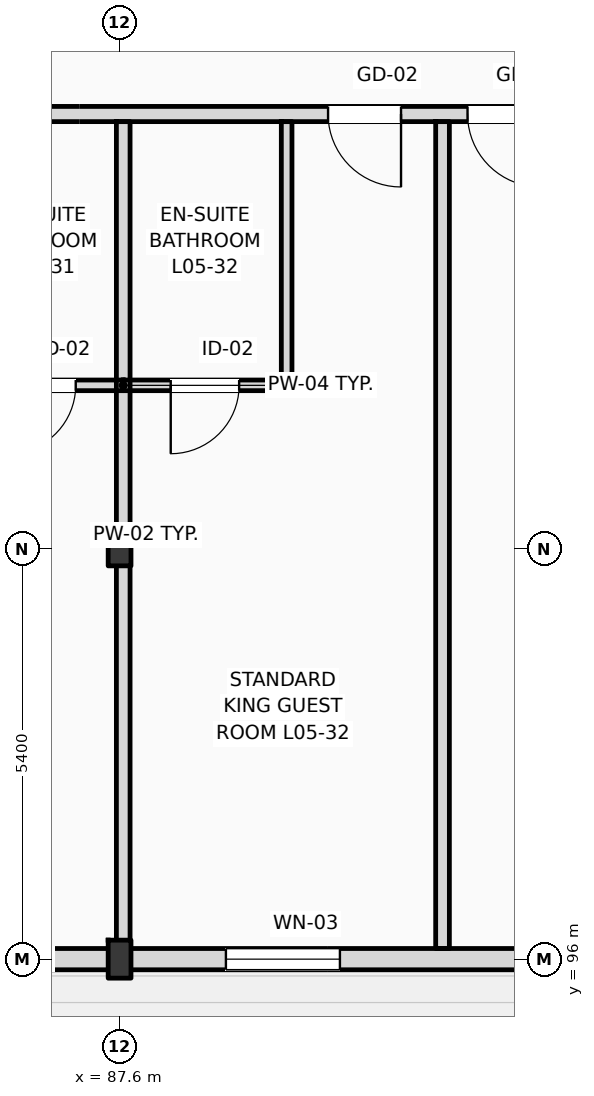
"""IFC4 building model, lengths in metres.
Left out: names, types, materials, properties, quantities, classifications, styles, units other than length and angle.
Written with IfcOpenShell. Run it as: python <this file> out.ifc"""

import sys

from ifc_helpers import new_model, si_unit, direction, frame, frame_2d, origin, origin_2d, place, context, subcontext, project, spatial, rectangle, i_section, extrude, element, fill, save


model = new_model("IFC4")
c1 = context("Model", 3, precision=1e-05, world=origin(), true_north=direction((0.0, 1.0)))
c2 = subcontext(c1, "Body", "Model", "MODEL_VIEW")
j1 = project(units=[si_unit("LENGTHUNIT", "METRE"), si_unit("PLANEANGLEUNIT", "RADIAN")], contexts=[c1])
p1 = place(None, origin())
s1 = spatial("IfcSite", under=j1, at=p1, CompositionType="ELEMENT")
p2 = place(p1, origin())
s2 = spatial("IfcBuilding", under=s1, at=p2, CompositionType="ELEMENT")
p3 = place(p2, frame((0.0, 0.0, 24.6)))
s3 = spatial("IfcBuildingStorey", under=s2, at=p3, CompositionType="ELEMENT", Elevation=24.6)
p4 = place(p3, frame((87.6, 96.0, 0.0), z_axis=(0.0, 0.0, 1.0), x_axis=(1.0, 0.0, 0.0)))
e1 = element("IfcColumn", 1, at=p4, inside=s3, PredefinedType="COLUMN", context=c2, shape_type="SweptSolid", body=[
    extrude(i_section(OverallWidth=0.3, OverallDepth=0.5, WebThickness=0.014, FlangeThickness=0.028, FilletRadius=0.027, at=origin_2d()), origin(), (0.0, 0.0, 1.0), 3.6),
])
p5 = place(p3, frame((87.6, 101.4, 0.0), z_axis=(0.0, 0.0, 1.0), x_axis=(1.0, 0.0, 0.0)))
e2 = element("IfcColumn", 2, at=p5, inside=s3, PredefinedType="COLUMN", context=c2, shape_type="SweptSolid", body=[
    extrude(i_section(OverallWidth=0.3, OverallDepth=0.45, WebThickness=0.014, FlangeThickness=0.026, FilletRadius=0.027, at=origin_2d()), origin(), (0.0, 0.0, 1.0), 3.6),
])
p6 = place(p3, frame((25.2, 96.0, 0.0), z_axis=(0.0, 0.0, 1.0), x_axis=(1.0, 0.0, 0.0)))
e3 = element("IfcWall", 3, at=p6, inside=s3, PredefinedType="STANDARD", context=c2, shape_type="SweptSolid", body=[
    extrude(rectangle(XDim=94.8, YDim=0.28, at=frame_2d((47.4, 0.0))), origin(), (0.0, 0.0, 1.0), 2.78),
])
p7 = place(p6, frame((16.539, 0.0, 0.9)))
e4 = element("IfcOpeningElement", 4, at=p7, cuts=e3, PredefinedType="OPENING", context=c2, shape_type="SweptSolid", body=[
    extrude(rectangle(XDim=1.75, YDim=1.7, at=frame_2d((0.875, 0.85))), frame((0.0, 0.15, 0.0), z_axis=(0.0, -1.0, 0.0), x_axis=(1.0, 0.0, 0.0)), (0.0, 0.0, 1.0), 0.3),
])
p8 = place(p6, frame((20.367, 0.0, 0.9)))
e5 = element("IfcOpeningElement", 5, at=p8, cuts=e3, PredefinedType="OPENING", context=c2, shape_type="SweptSolid", body=[
    extrude(rectangle(XDim=2.0, YDim=1.7, at=frame_2d((1.0, 0.85))), frame((0.0, 0.15, 0.0), z_axis=(0.0, -1.0, 0.0), x_axis=(1.0, 0.0, 0.0)), (0.0, 0.0, 1.0), 0.3),
])
p9 = place(p6, frame((24.326, 0.0, 0.9)))
e6 = element("IfcOpeningElement", 6, at=p9, cuts=e3, PredefinedType="OPENING", context=c2, shape_type="SweptSolid", body=[
    extrude(rectangle(XDim=2.3, YDim=1.7, at=frame_2d((1.15, 0.85))), frame((0.0, 0.15, 0.0), z_axis=(0.0, -1.0, 0.0), x_axis=(1.0, 0.0, 0.0)), (0.0, 0.0, 1.0), 0.3),
])
p10 = place(p6, frame((27.684, 0.0, 0.9)))
e7 = element("IfcOpeningElement", 7, at=p10, cuts=e3, PredefinedType="OPENING", context=c2, shape_type="SweptSolid", body=[
    extrude(rectangle(XDim=2.6, YDim=1.7, at=frame_2d((1.3, 0.85))), frame((0.0, 0.15, 0.0), z_axis=(0.0, -1.0, 0.0), x_axis=(1.0, 0.0, 0.0)), (0.0, 0.0, 1.0), 0.3),
])
p11 = place(p6, frame((32.083, 0.0, 0.9)))
e8 = element("IfcOpeningElement", 8, at=p11, cuts=e3, PredefinedType="OPENING", context=c2, shape_type="SweptSolid", body=[
    extrude(rectangle(XDim=2.419, YDim=1.7, at=frame_2d((1.209, 0.85))), frame((0.0, 0.15, 0.0), z_axis=(0.0, -1.0, 0.0), x_axis=(1.0, 0.0, 0.0)), (0.0, 0.0, 1.0), 0.3),
])
p12 = place(p6, frame((35.322, 0.0, 0.9)))
e9 = element("IfcOpeningElement", 9, at=p12, cuts=e3, PredefinedType="OPENING", context=c2, shape_type="SweptSolid", body=[
    extrude(rectangle(XDim=2.868, YDim=1.7, at=frame_2d((1.434, 0.85))), frame((0.0, 0.15, 0.0), z_axis=(0.0, -1.0, 0.0), x_axis=(1.0, 0.0, 0.0)), (0.0, 0.0, 1.0), 0.3),
])
p13 = place(p6, frame((56.015, 0.0, 0.9)))
e10 = element("IfcOpeningElement", 10, at=p13, cuts=e3, PredefinedType="OPENING", context=c2, shape_type="SweptSolid", body=[
    extrude(rectangle(XDim=1.2, YDim=1.7, at=frame_2d((0.6, 0.85))), frame((0.0, 0.15, 0.0), z_axis=(0.0, -1.0, 0.0), x_axis=(1.0, 0.0, 0.0)), (0.0, 0.0, 1.0), 0.3),
])
p14 = place(p6, frame((59.888, 0.0, 0.9)))
e11 = element("IfcOpeningElement", 11, at=p14, cuts=e3, PredefinedType="OPENING", context=c2, shape_type="SweptSolid", body=[
    extrude(rectangle(XDim=1.35, YDim=1.7, at=frame_2d((0.675, 0.85))), frame((0.0, 0.15, 0.0), z_axis=(0.0, -1.0, 0.0), x_axis=(1.0, 0.0, 0.0)), (0.0, 0.0, 1.0), 0.3),
])
p15 = place(p6, frame((63.799, 0.0, 0.9)))
e12 = element("IfcOpeningElement", 12, at=p15, cuts=e3, PredefinedType="OPENING", context=c2, shape_type="SweptSolid", body=[
    extrude(rectangle(XDim=1.5, YDim=1.7, at=frame_2d((0.75, 0.85))), frame((0.0, 0.15, 0.0), z_axis=(0.0, -1.0, 0.0), x_axis=(1.0, 0.0, 0.0)), (0.0, 0.0, 1.0), 0.3),
])
p16 = place(p6, frame((67.709, 0.0, 0.9)))
e13 = element("IfcOpeningElement", 13, at=p16, cuts=e3, PredefinedType="OPENING", context=c2, shape_type="SweptSolid", body=[
    extrude(rectangle(XDim=1.65, YDim=1.7, at=frame_2d((0.825, 0.85))), frame((0.0, 0.15, 0.0), z_axis=(0.0, -1.0, 0.0), x_axis=(1.0, 0.0, 0.0)), (0.0, 0.0, 1.0), 0.3),
])
p17 = place(p6, frame((71.618, 0.0, 0.9)))
e14 = element("IfcOpeningElement", 14, at=p17, cuts=e3, PredefinedType="OPENING", context=c2, shape_type="SweptSolid", body=[
    extrude(rectangle(XDim=1.8, YDim=1.7, at=frame_2d((0.9, 0.85))), frame((0.0, 0.15, 0.0), z_axis=(0.0, -1.0, 0.0), x_axis=(1.0, 0.0, 0.0)), (0.0, 0.0, 1.0), 0.3),
])
p18 = place(p6, frame((75.129, 0.0, 0.9)))
e15 = element("IfcOpeningElement", 15, at=p18, cuts=e3, PredefinedType="OPENING", context=c2, shape_type="SweptSolid", body=[
    extrude(rectangle(XDim=1.95, YDim=1.7, at=frame_2d((0.975, 0.85))), frame((0.0, 0.15, 0.0), z_axis=(0.0, -1.0, 0.0), x_axis=(1.0, 0.0, 0.0)), (0.0, 0.0, 1.0), 0.3),
])
p19 = place(p6, frame((79.439, 0.0, 0.9)))
e16 = element("IfcOpeningElement", 16, at=p19, cuts=e3, PredefinedType="OPENING", context=c2, shape_type="SweptSolid", body=[
    extrude(rectangle(XDim=2.1, YDim=1.7, at=frame_2d((1.05, 0.85))), frame((0.0, 0.15, 0.0), z_axis=(0.0, -1.0, 0.0), x_axis=(1.0, 0.0, 0.0)), (0.0, 0.0, 1.0), 0.3),
])
p20 = place(p6, frame((83.349, 0.0, 0.9)))
e17 = element("IfcOpeningElement", 17, at=p20, cuts=e3, PredefinedType="OPENING", context=c2, shape_type="SweptSolid", body=[
    extrude(rectangle(XDim=2.25, YDim=1.7, at=frame_2d((1.125, 0.85))), frame((0.0, 0.15, 0.0), z_axis=(0.0, -1.0, 0.0), x_axis=(1.0, 0.0, 0.0)), (0.0, 0.0, 1.0), 0.3),
])
p21 = place(p6, frame((87.258, 0.0, 0.9)))
e18 = element("IfcOpeningElement", 18, at=p21, cuts=e3, PredefinedType="OPENING", context=c2, shape_type="SweptSolid", body=[
    extrude(rectangle(XDim=2.4, YDim=1.7, at=frame_2d((1.2, 0.85))), frame((0.0, 0.15, 0.0), z_axis=(0.0, -1.0, 0.0), x_axis=(1.0, 0.0, 0.0)), (0.0, 0.0, 1.0), 0.3),
])
p22 = place(p6, frame((91.204, 0.0, 0.9)))
e19 = element("IfcOpeningElement", 19, at=p22, cuts=e3, PredefinedType="OPENING", context=c2, shape_type="SweptSolid", body=[
    extrude(rectangle(XDim=2.55, YDim=1.7, at=frame_2d((1.275, 0.85))), frame((0.0, 0.15, 0.0), z_axis=(0.0, -1.0, 0.0), x_axis=(1.0, 0.0, 0.0)), (0.0, 0.0, 1.0), 0.3),
])
p23 = place(p3, frame((79.76, 107.12, 0.0), z_axis=(0.0, 0.0, 1.0), x_axis=(1.0, 0.0, 0.0)))
e20 = element("IfcWall", 20, at=p23, inside=s3, PredefinedType="PARTITIONING", context=c2, shape_type="SweptSolid", body=[
    extrude(rectangle(XDim=40.1, YDim=0.2, at=frame_2d((20.05, 0.0))), origin(), (0.0, 0.0, 1.0), 3.34),
])
p24 = place(p23, frame((2.65, 0.0, 0.0)))
e21 = element("IfcOpeningElement", 21, at=p24, cuts=e20, PredefinedType="OPENING", context=c2, shape_type="SweptSolid", body=[
    extrude(rectangle(XDim=0.96, YDim=2.2, at=frame_2d((0.48, 1.1))), frame((0.0, 0.11, 0.0), z_axis=(0.0, -1.0, 0.0), x_axis=(1.0, 0.0, 0.0)), (0.0, 0.0, 1.0), 0.22),
])
p25 = place(p23, frame((4.448, 0.0, 0.0)))
e22 = element("IfcOpeningElement", 22, at=p25, cuts=e20, PredefinedType="OPENING", context=c2, shape_type="SweptSolid", body=[
    extrude(rectangle(XDim=0.96, YDim=2.2, at=frame_2d((0.48, 1.1))), frame((0.0, 0.11, 0.0), z_axis=(0.0, -1.0, 0.0), x_axis=(1.0, 0.0, 0.0)), (0.0, 0.0, 1.0), 0.22),
])
p26 = place(p23, frame((10.583, 0.0, 0.0)))
e23 = element("IfcOpeningElement", 23, at=p26, cuts=e20, PredefinedType="OPENING", context=c2, shape_type="SweptSolid", body=[
    extrude(rectangle(XDim=0.96, YDim=2.2, at=frame_2d((0.48, 1.1))), frame((0.0, 0.11, 0.0), z_axis=(0.0, -1.0, 0.0), x_axis=(1.0, 0.0, 0.0)), (0.0, 0.0, 1.0), 0.22),
])
p27 = place(p23, frame((12.418, 0.0, 0.0)))
e24 = element("IfcOpeningElement", 24, at=p27, cuts=e20, PredefinedType="OPENING", context=c2, shape_type="SweptSolid", body=[
    extrude(rectangle(XDim=0.96, YDim=2.2, at=frame_2d((0.48, 1.1))), frame((0.0, 0.11, 0.0), z_axis=(0.0, -1.0, 0.0), x_axis=(1.0, 0.0, 0.0)), (0.0, 0.0, 1.0), 0.22),
])
p28 = place(p23, frame((18.553, 0.0, 0.0)))
e25 = element("IfcOpeningElement", 25, at=p28, cuts=e20, PredefinedType="OPENING", context=c2, shape_type="SweptSolid", body=[
    extrude(rectangle(XDim=0.96, YDim=2.2, at=frame_2d((0.48, 1.1))), frame((0.0, 0.11, 0.0), z_axis=(0.0, -1.0, 0.0), x_axis=(1.0, 0.0, 0.0)), (0.0, 0.0, 1.0), 0.22),
])
p29 = place(p23, frame((20.388, 0.0, 0.0)))
e26 = element("IfcOpeningElement", 26, at=p29, cuts=e20, PredefinedType="OPENING", context=c2, shape_type="SweptSolid", body=[
    extrude(rectangle(XDim=0.96, YDim=2.2, at=frame_2d((0.48, 1.1))), frame((0.0, 0.11, 0.0), z_axis=(0.0, -1.0, 0.0), x_axis=(1.0, 0.0, 0.0)), (0.0, 0.0, 1.0), 0.22),
])
p30 = place(p23, frame((26.523, 0.0, 0.0)))
e27 = element("IfcOpeningElement", 27, at=p30, cuts=e20, PredefinedType="OPENING", context=c2, shape_type="SweptSolid", body=[
    extrude(rectangle(XDim=0.96, YDim=2.2, at=frame_2d((0.48, 1.1))), frame((0.0, 0.11, 0.0), z_axis=(0.0, -1.0, 0.0), x_axis=(1.0, 0.0, 0.0)), (0.0, 0.0, 1.0), 0.22),
])
p31 = place(p23, frame((28.358, 0.0, 0.0)))
e28 = element("IfcOpeningElement", 28, at=p31, cuts=e20, PredefinedType="OPENING", context=c2, shape_type="SweptSolid", body=[
    extrude(rectangle(XDim=0.96, YDim=2.2, at=frame_2d((0.48, 1.1))), frame((0.0, 0.11, 0.0), z_axis=(0.0, -1.0, 0.0), x_axis=(1.0, 0.0, 0.0)), (0.0, 0.0, 1.0), 0.22),
])
p32 = place(p23, frame((34.493, 0.0, 0.0)))
e29 = element("IfcOpeningElement", 29, at=p32, cuts=e20, PredefinedType="OPENING", context=c2, shape_type="SweptSolid", body=[
    extrude(rectangle(XDim=0.96, YDim=2.2, at=frame_2d((0.48, 1.1))), frame((0.0, 0.11, 0.0), z_axis=(0.0, -1.0, 0.0), x_axis=(1.0, 0.0, 0.0)), (0.0, 0.0, 1.0), 0.22),
])
p33 = place(p23, frame((36.364, 0.0, 0.0)))
e30 = element("IfcOpeningElement", 30, at=p33, cuts=e20, PredefinedType="OPENING", context=c2, shape_type="SweptSolid", body=[
    extrude(rectangle(XDim=0.96, YDim=2.2, at=frame_2d((0.48, 1.1))), frame((0.0, 0.11, 0.0), z_axis=(0.0, -1.0, 0.0), x_axis=(1.0, 0.0, 0.0)), (0.0, 0.0, 1.0), 0.22),
])
p34 = place(p3, frame((87.648, 96.14, 0.0), z_axis=(0.0, 0.0, 1.0), x_axis=(0.0, 1.0, 0.0)))
e31 = element("IfcWall", 31, at=p34, inside=s3, PredefinedType="PARTITIONING", context=c2, shape_type="SweptSolid", body=[
    extrude(rectangle(XDim=10.88, YDim=0.18, at=frame_2d((5.44, 0.0))), origin(), (0.0, 0.0, 1.0), 2.93),
])
p35 = place(p3, frame((85.498, 103.55, 0.0), z_axis=(0.0, 0.0, 1.0), x_axis=(1.0, 0.0, 0.0)))
e32 = element("IfcWall", 32, at=p35, inside=s3, PredefinedType="PARTITIONING", context=c2, shape_type="SweptSolid", body=[
    extrude(rectangle(XDim=2.15, YDim=0.14, at=frame_2d((1.075, 0.0))), origin(), (0.0, 0.0, 1.0), 3.34),
])
p36 = place(p35, frame((0.625, 0.0, 0.0)))
e33 = element("IfcOpeningElement", 33, at=p36, cuts=e32, PredefinedType="OPENING", context=c2, shape_type="SweptSolid", body=[
    extrude(rectangle(XDim=0.9, YDim=2.1, at=frame_2d((0.45, 1.05))), frame((0.0, 0.08, 0.0), z_axis=(0.0, -1.0, 0.0), x_axis=(1.0, 0.0, 0.0)), (0.0, 0.0, 1.0), 0.16),
])
p37 = place(p3, frame((91.849, 96.14, 0.0), z_axis=(0.0, 0.0, 1.0), x_axis=(0.0, 1.0, 0.0)))
e34 = element("IfcWall", 34, at=p37, inside=s3, PredefinedType="PARTITIONING", context=c2, shape_type="SweptSolid", body=[
    extrude(rectangle(XDim=10.88, YDim=0.18, at=frame_2d((5.44, 0.0))), origin(), (0.0, 0.0, 1.0), 3.34),
])
p38 = place(p3, frame((89.798, 103.55, 0.0), z_axis=(0.0, 0.0, 1.0), x_axis=(0.0, 1.0, 0.0)))
e35 = element("IfcWall", 35, at=p38, inside=s3, PredefinedType="PARTITIONING", context=c2, shape_type="SweptSolid", body=[
    extrude(rectangle(XDim=3.47, YDim=0.14, at=frame_2d((1.735, 0.0))), origin(), (0.0, 0.0, 1.0), 3.34),
])
p39 = place(p3, frame((87.648, 103.55, 0.0), z_axis=(0.0, 0.0, 1.0), x_axis=(1.0, 0.0, 0.0)))
e36 = element("IfcWall", 36, at=p39, inside=s3, PredefinedType="PARTITIONING", context=c2, shape_type="SweptSolid", body=[
    extrude(rectangle(XDim=2.15, YDim=0.14, at=frame_2d((1.075, 0.0))), origin(), (0.0, 0.0, 1.0), 3.34),
])
p40 = place(p39, frame((0.625, 0.0, 0.0)))
e37 = element("IfcOpeningElement", 37, at=p40, cuts=e36, PredefinedType="OPENING", context=c2, shape_type="SweptSolid", body=[
    extrude(rectangle(XDim=0.9, YDim=2.1, at=frame_2d((0.45, 1.05))), frame((0.0, 0.08, 0.0), z_axis=(0.0, -1.0, 0.0), x_axis=(1.0, 0.0, 0.0)), (0.0, 0.0, 1.0), 0.16),
])
p41 = place(p15, origin())
e38 = element("IfcWindow", 38, at=p41, inside=s3, PartitioningType="DOUBLE_PANEL_VERTICAL", PredefinedType="WINDOW", context=c2, shape_type="SweptSolid", body=[
    extrude(rectangle(XDim=1.5, YDim=1.7, at=frame_2d((0.75, 0.85))), frame((0.0, 0.03, 0.0), z_axis=(0.0, -1.0, 0.0), x_axis=(1.0, 0.0, 0.0)), (0.0, 0.0, 1.0), 0.06),
])
fill(e12, e38)
p42 = place(p36, frame((0.9, 0.0, 0.0), z_axis=(0.0, 0.0, 1.0), x_axis=(-1.0, 0.0, 0.0)))
e39 = element("IfcDoor", 39, at=p42, inside=s3, OperationType="SINGLE_SWING_LEFT", PredefinedType="DOOR", context=c2, shape_type="SweptSolid", body=[
    extrude(rectangle(XDim=0.9, YDim=2.1, at=frame_2d((0.45, 1.05))), frame((0.0, 0.025, 0.0), z_axis=(0.0, -1.0, 0.0), x_axis=(1.0, 0.0, 0.0)), (0.0, 0.0, 1.0), 0.05),
])
fill(e33, e39)
p43 = place(p26, frame((0.96, 0.0, 0.0), z_axis=(0.0, 0.0, 1.0), x_axis=(-1.0, 0.0, 0.0)))
e40 = element("IfcDoor", 40, at=p43, inside=s3, OperationType="SINGLE_SWING_RIGHT", PredefinedType="DOOR", context=c2, shape_type="SweptSolid", body=[
    extrude(rectangle(XDim=0.96, YDim=2.2, at=frame_2d((0.48, 1.1))), frame((0.0, 0.025, 0.0), z_axis=(0.0, -1.0, 0.0), x_axis=(1.0, 0.0, 0.0)), (0.0, 0.0, 1.0), 0.05),
])
fill(e23, e40)
p44 = place(p40, frame((0.9, 0.0, 0.0), z_axis=(0.0, 0.0, 1.0), x_axis=(-1.0, 0.0, 0.0)))
e41 = element("IfcDoor", 41, at=p44, inside=s3, OperationType="SINGLE_SWING_LEFT", PredefinedType="DOOR", context=c2, shape_type="SweptSolid", body=[
    extrude(rectangle(XDim=0.9, YDim=2.1, at=frame_2d((0.45, 1.05))), frame((0.0, 0.025, 0.0), z_axis=(0.0, -1.0, 0.0), x_axis=(1.0, 0.0, 0.0)), (0.0, 0.0, 1.0), 0.05),
])
fill(e37, e41)
p45 = place(p27, frame((0.96, 0.0, 0.0), z_axis=(0.0, 0.0, 1.0), x_axis=(-1.0, 0.0, 0.0)))
e42 = element("IfcDoor", 42, at=p45, inside=s3, OperationType="SINGLE_SWING_RIGHT", PredefinedType="DOOR", context=c2, shape_type="SweptSolid", body=[
    extrude(rectangle(XDim=0.96, YDim=2.2, at=frame_2d((0.48, 1.1))), frame((0.0, 0.025, 0.0), z_axis=(0.0, -1.0, 0.0), x_axis=(1.0, 0.0, 0.0)), (0.0, 0.0, 1.0), 0.05),
])
fill(e24, e42)
save(model, sys.argv[1])
